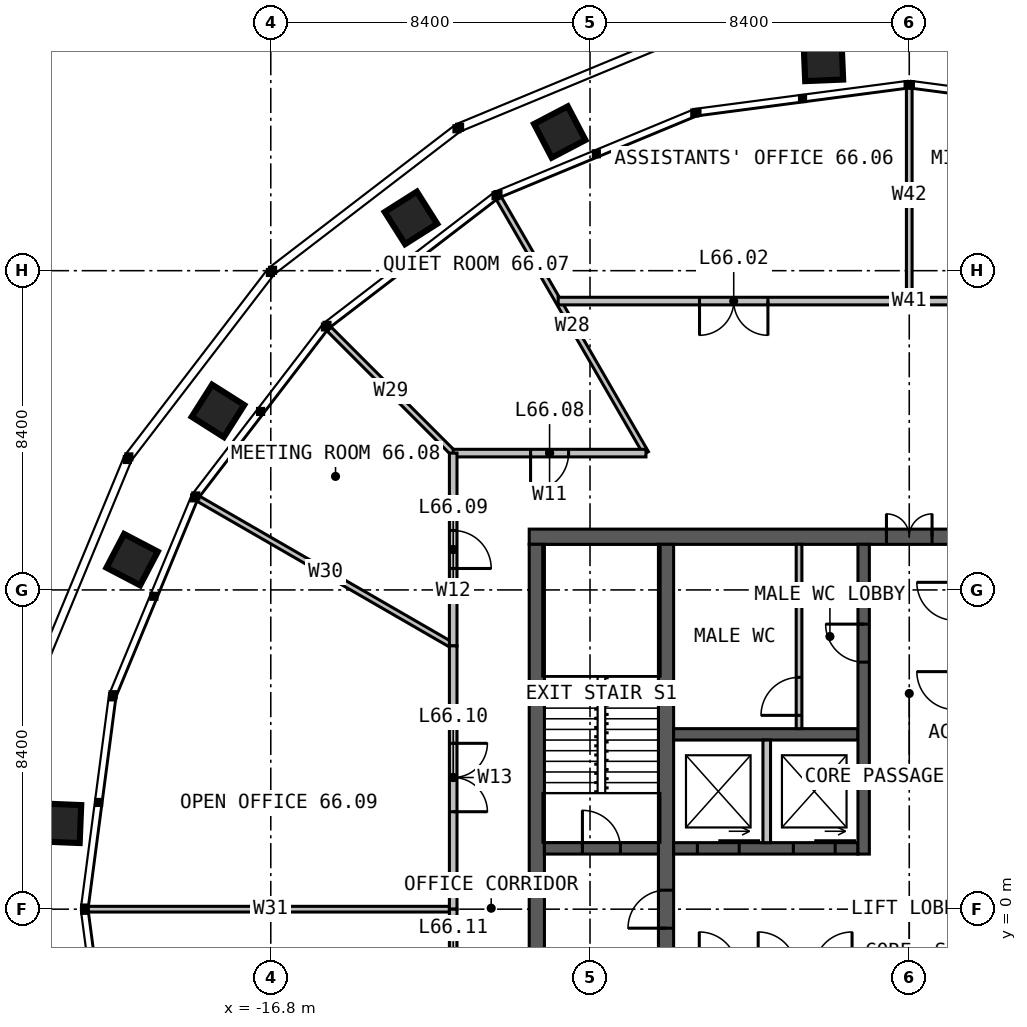
"""IFC4 building model, lengths in metres.
Left out: names, types, materials, properties, quantities, classifications, styles, units other than length and angle.
Written with IfcOpenShell. Run it as: python <this file> out.ifc"""

import sys

from ifc_helpers import new_model, si_unit, direction, frame, frame_2d, origin, place, context, subcontext, project, spatial, rectangle, extrude, element, fill, save


model = new_model("IFC4")
c1 = context("Model", 3, precision=1e-05, world=origin(), true_north=direction((0.0, 1.0)))
c2 = subcontext(c1, "Body", "Model", "MODEL_VIEW")
j1 = project(units=[si_unit("LENGTHUNIT", "METRE"), si_unit("PLANEANGLEUNIT", "RADIAN")], contexts=[c1])
p1 = place(None, origin())
s1 = spatial("IfcSite", under=j1, at=p1, CompositionType="ELEMENT")
p2 = place(p1, origin())
s2 = spatial("IfcBuilding", under=s1, at=p2, CompositionType="ELEMENT")
p3 = place(p2, frame((0.0, 0.0, 272.0)))
s3 = spatial("IfcBuildingStorey", under=s2, at=p3, CompositionType="ELEMENT", Elevation=272.0)
p4 = place(p3, frame((-10.0, 9.8, 0.0), z_axis=(0.0, 0.0, 1.0), x_axis=(1.0, 0.0, 0.0)))
e1 = element("IfcWall", 1, at=p4, inside=s3, PredefinedType="SOLIDWALL", context=c2, shape_type="SweptSolid", body=[
    extrude(rectangle(XDim=20.0, YDim=0.4, at=frame_2d((10.0, 0.0))), origin(), (0.0, 0.0, 1.0), 4.0),
])
p5 = place(p4, frame((9.4, 0.0, 0.0)))
e2 = element("IfcOpeningElement", 2, at=p5, cuts=e1, PredefinedType="OPENING", context=c2, shape_type="SweptSolid", body=[
    extrude(rectangle(XDim=1.2, YDim=2.2, at=frame_2d((0.6, 1.1))), frame((0.0, 0.21, 0.0), z_axis=(0.0, -1.0, 0.0), x_axis=(1.0, 0.0, 0.0)), (0.0, 0.0, 1.0), 0.42),
])
p6 = place(p3, frame((-9.8, 9.6, 0.0), z_axis=(0.0, 0.0, 1.0), x_axis=(0.0, -1.0, 0.0)))
e3 = element("IfcWall", 3, at=p6, inside=s3, PredefinedType="SOLIDWALL", context=c2, shape_type="SweptSolid", body=[
    extrude(rectangle(XDim=19.2, YDim=0.4, at=frame_2d((9.6, 0.0))), origin(), (0.0, 0.0, 1.0), 4.0),
])
p7 = place(p3, frame((-6.4, -9.6, 0.0), z_axis=(0.0, 0.0, 1.0), x_axis=(0.0, 1.0, 0.0)))
e4 = element("IfcWall", 4, at=p7, inside=s3, PredefinedType="SOLIDWALL", context=c2, shape_type="SweptSolid", body=[
    extrude(rectangle(XDim=19.2, YDim=0.4, at=frame_2d((9.6, 0.0))), origin(), (0.0, 0.0, 1.0), 4.0),
])
p8 = place(p7, frame((9.1, 0.0, 0.0)))
e5 = element("IfcOpeningElement", 5, at=p8, cuts=e4, PredefinedType="OPENING", context=c2, shape_type="SweptSolid", body=[
    extrude(rectangle(XDim=1.0, YDim=2.2, at=frame_2d((0.5, 1.1))), frame((0.0, 0.21, 0.0), z_axis=(0.0, -1.0, 0.0), x_axis=(1.0, 0.0, 0.0)), (0.0, 0.0, 1.0), 0.42),
])
p9 = place(p3, frame((-6.2, 1.6, 0.0), z_axis=(0.0, 0.0, 1.0), x_axis=(1.0, 0.0, 0.0)))
e6 = element("IfcWall", 6, at=p9, inside=s3, PredefinedType="SOLIDWALL", context=c2, shape_type="SweptSolid", body=[
    extrude(rectangle(XDim=4.85, YDim=0.3, at=frame_2d((2.425, 0.0))), origin(), (0.0, 0.0, 1.0), 4.0),
])
p10 = place(p9, frame((0.625, 0.0, 0.0)))
e7 = element("IfcOpeningElement", 7, at=p10, cuts=e6, PredefinedType="OPENING", context=c2, shape_type="SweptSolid", body=[
    extrude(rectangle(XDim=1.1, YDim=2.2, at=frame_2d((0.55, 1.1))), frame((0.0, 0.16, 0.0), z_axis=(0.0, -1.0, 0.0), x_axis=(1.0, 0.0, 0.0)), (0.0, 0.0, 1.0), 0.32),
])
p11 = place(p9, frame((3.15, 0.0, 0.0)))
e8 = element("IfcOpeningElement", 8, at=p11, cuts=e6, PredefinedType="OPENING", context=c2, shape_type="SweptSolid", body=[
    extrude(rectangle(XDim=1.1, YDim=2.2, at=frame_2d((0.55, 1.1))), frame((0.0, 0.16, 0.0), z_axis=(0.0, -1.0, 0.0), x_axis=(1.0, 0.0, 0.0)), (0.0, 0.0, 1.0), 0.32),
])
p12 = place(p3, frame((-6.2, 4.6, 0.0), z_axis=(0.0, 0.0, 1.0), x_axis=(1.0, 0.0, 0.0)))
e9 = element("IfcWall", 9, at=p12, inside=s3, PredefinedType="SOLIDWALL", context=c2, shape_type="SweptSolid", body=[
    extrude(rectangle(XDim=4.85, YDim=0.3, at=frame_2d((2.425, 0.0))), origin(), (0.0, 0.0, 1.0), 4.0),
])
p13 = place(p3, frame((-1.2, 1.45, 0.0), z_axis=(0.0, 0.0, 1.0), x_axis=(0.0, 1.0, 0.0)))
e10 = element("IfcWall", 10, at=p13, inside=s3, PredefinedType="SOLIDWALL", context=c2, shape_type="SweptSolid", body=[
    extrude(rectangle(XDim=8.15, YDim=0.3, at=frame_2d((4.075, 0.0))), origin(), (0.0, 0.0, 1.0), 4.0),
])
p14 = place(p13, frame((5.05, 0.0, 0.0)))
e11 = element("IfcOpeningElement", 11, at=p14, cuts=e10, PredefinedType="OPENING", context=c2, shape_type="SweptSolid", body=[
    extrude(rectangle(XDim=1.0, YDim=2.2, at=frame_2d((0.5, 1.1))), frame((0.0, 0.16, 0.0), z_axis=(0.0, -1.0, 0.0), x_axis=(1.0, 0.0, 0.0)), (0.0, 0.0, 1.0), 0.32),
])
p15 = place(p3, frame((-9.6, 1.6, 0.0), z_axis=(0.0, 0.0, 1.0), x_axis=(1.0, 0.0, 0.0)))
e12 = element("IfcWall", 12, at=p15, inside=s3, PredefinedType="SOLIDWALL", context=c2, shape_type="SweptSolid", body=[
    extrude(rectangle(XDim=3.0, YDim=0.3, at=frame_2d((1.5, 0.0))), origin(), (0.0, 0.0, 1.0), 4.0),
])
p16 = place(p15, frame((1.0, 0.0, 0.0)))
e13 = element("IfcOpeningElement", 13, at=p16, cuts=e12, PredefinedType="OPENING", context=c2, shape_type="SweptSolid", body=[
    extrude(rectangle(XDim=1.0, YDim=2.2, at=frame_2d((0.5, 1.1))), frame((0.0, 0.16, 0.0), z_axis=(0.0, -1.0, 0.0), x_axis=(1.0, 0.0, 0.0)), (0.0, 0.0, 1.0), 0.32),
])
p17 = place(p3, frame((-3.75, 1.75, 0.0), z_axis=(0.0, 0.0, 1.0), x_axis=(0.0, 1.0, 0.0)))
e14 = element("IfcWall", 14, at=p17, inside=s3, PredefinedType="SOLIDWALL", context=c2, shape_type="SweptSolid", body=[
    extrude(rectangle(XDim=2.7, YDim=0.2, at=frame_2d((1.35, 0.0))), origin(), (0.0, 0.0, 1.0), 3.75),
])
p18 = place(p3, frame((-2.9, 4.75, 0.0), z_axis=(0.0, 0.0, 1.0), x_axis=(0.0, 1.0, 0.0)))
e15 = element("IfcWall", 15, at=p18, inside=s3, PredefinedType="PARTITIONING", context=c2, shape_type="SweptSolid", body=[
    extrude(rectangle(XDim=4.85, YDim=0.15, at=frame_2d((2.425, 0.0))), origin(), (0.0, 0.0, 1.0), 3.75),
])
p19 = place(p18, frame((0.35, 0.0, 0.0)))
e16 = element("IfcOpeningElement", 16, at=p19, cuts=e15, PredefinedType="OPENING", context=c2, shape_type="SweptSolid", body=[
    extrude(rectangle(XDim=1.0, YDim=2.2, at=frame_2d((0.5, 1.1))), frame((0.0, 0.085, 0.0), z_axis=(0.0, -1.0, 0.0), x_axis=(1.0, 0.0, 0.0)), (0.0, 0.0, 1.0), 0.17),
])
p20 = place(p3, frame((-6.928, 12.0, 0.0), z_axis=(0.0, 0.0, 1.0), x_axis=(-0.500000526688, 0.866025099701, 0.0)))
e17 = element("IfcWall", 17, at=p20, inside=s3, PredefinedType="PARTITIONING", context=c2, shape_type="SweptSolid", body=[
    extrude(rectangle(XDim=7.752, YDim=0.15, at=frame_2d((3.876, 0.0))), origin(), (0.0, 0.0, 1.0), 2.79),
])
p21 = place(p3, frame((-12.0, 12.0, 0.0), z_axis=(0.0, 0.0, 1.0), x_axis=(-0.707106781187, 0.707106781187, 0.0)))
e18 = element("IfcWall", 18, at=p21, inside=s3, PredefinedType="PARTITIONING", context=c2, shape_type="SweptSolid", body=[
    extrude(rectangle(XDim=4.638, YDim=0.15, at=frame_2d((2.319, 0.0))), origin(), (0.0, 0.0, 1.0), 2.79),
])
p22 = place(p3, frame((-12.0, 6.928, 0.0), z_axis=(0.0, 0.0, 1.0), x_axis=(-0.866025099701, 0.500000526688, 0.0)))
e19 = element("IfcWall", 19, at=p22, inside=s3, PredefinedType="PARTITIONING", context=c2, shape_type="SweptSolid", body=[
    extrude(rectangle(XDim=7.752, YDim=0.15, at=frame_2d((3.876, 0.0))), origin(), (0.0, 0.0, 1.0), 2.79),
])
p23 = place(p3, frame((-12.0, 0.0, 0.0), z_axis=(0.0, 0.0, 1.0), x_axis=(-1.0, 0.0, 0.0)))
e20 = element("IfcWall", 20, at=p23, inside=s3, PredefinedType="PARTITIONING", context=c2, shape_type="SweptSolid", body=[
    extrude(rectangle(XDim=9.608, YDim=0.15, at=frame_2d((4.804, 0.0))), origin(), (0.0, 0.0, 1.0), 2.79),
])
p24 = place(p3, frame((9.238, 16.0, 0.0), z_axis=(0.0, 0.0, 1.0), x_axis=(-1.0, 0.0, 0.0)))
e21 = element("IfcWall", 21, at=p24, inside=s3, PredefinedType="PARTITIONING", context=c2, shape_type="SweptSolid", body=[
    extrude(rectangle(XDim=18.475, YDim=0.2, at=frame_2d((9.238, 0.0))), origin(), (0.0, 0.0, 1.0), 3.8),
])
p25 = place(p24, frame((3.719, 0.0, 0.0)))
e22 = element("IfcOpeningElement", 22, at=p25, cuts=e21, PredefinedType="OPENING", context=c2, shape_type="SweptSolid", body=[
    extrude(rectangle(XDim=1.8, YDim=2.2, at=frame_2d((0.9, 1.1))), frame((0.0, 0.11, 0.0), z_axis=(0.0, -1.0, 0.0), x_axis=(1.0, 0.0, 0.0)), (0.0, 0.0, 1.0), 0.22),
])
p26 = place(p24, frame((12.956, 0.0, 0.0)))
e23 = element("IfcOpeningElement", 23, at=p26, cuts=e21, PredefinedType="OPENING", context=c2, shape_type="SweptSolid", body=[
    extrude(rectangle(XDim=1.8, YDim=2.2, at=frame_2d((0.9, 1.1))), frame((0.0, 0.11, 0.0), z_axis=(0.0, -1.0, 0.0), x_axis=(1.0, 0.0, 0.0)), (0.0, 0.0, 1.0), 0.22),
])
p27 = place(p3, frame((0.0, 16.0, 0.0), z_axis=(0.0, 0.0, 1.0), x_axis=(0.0, 1.0, 0.0)))
e24 = element("IfcWall", 24, at=p27, inside=s3, PredefinedType="PARTITIONING", context=c2, shape_type="SweptSolid", body=[
    extrude(rectangle(XDim=5.608, YDim=0.15, at=frame_2d((2.804, 0.0))), origin(), (0.0, 0.0, 1.0), 2.79),
])
p28 = place(p3, frame((-6.928, 12.0, 0.0), z_axis=(0.0, 0.0, 1.0), x_axis=(-1.0, 0.0, 0.0)))
e25 = element("IfcWall", 25, at=p28, inside=s3, PredefinedType="PARTITIONING", context=c2, shape_type="SweptSolid", body=[
    extrude(rectangle(XDim=5.072, YDim=0.2, at=frame_2d((2.536, 0.0))), origin(), (0.0, 0.0, 1.0), 3.8),
])
p29 = place(p28, frame((2.036, 0.0, 0.0)))
e26 = element("IfcOpeningElement", 26, at=p29, cuts=e25, PredefinedType="OPENING", context=c2, shape_type="SweptSolid", body=[
    extrude(rectangle(XDim=1.0, YDim=2.2, at=frame_2d((0.5, 1.1))), frame((0.0, 0.11, 0.0), z_axis=(0.0, -1.0, 0.0), x_axis=(1.0, 0.0, 0.0)), (0.0, 0.0, 1.0), 0.22),
])
p30 = place(p3, frame((-12.0, 12.0, 0.0), z_axis=(0.0, 0.0, 1.0), x_axis=(0.0, -1.0, 0.0)))
e27 = element("IfcWall", 27, at=p30, inside=s3, PredefinedType="PARTITIONING", context=c2, shape_type="SweptSolid", body=[
    extrude(rectangle(XDim=5.072, YDim=0.2, at=frame_2d((2.536, 0.0))), origin(), (0.0, 0.0, 1.0), 3.8),
])
p31 = place(p30, frame((2.036, 0.0, 0.0)))
e28 = element("IfcOpeningElement", 28, at=p31, cuts=e27, PredefinedType="OPENING", context=c2, shape_type="SweptSolid", body=[
    extrude(rectangle(XDim=1.0, YDim=2.2, at=frame_2d((0.5, 1.1))), frame((0.0, 0.11, 0.0), z_axis=(0.0, -1.0, 0.0), x_axis=(1.0, 0.0, 0.0)), (0.0, 0.0, 1.0), 0.22),
])
p32 = place(p3, frame((-12.0, 6.928, 0.0), z_axis=(0.0, 0.0, 1.0), x_axis=(0.0, -1.0, 0.0)))
e29 = element("IfcWall", 29, at=p32, inside=s3, PredefinedType="PARTITIONING", context=c2, shape_type="SweptSolid", body=[
    extrude(rectangle(XDim=6.928, YDim=0.2, at=frame_2d((3.464, 0.0))), origin(), (0.0, 0.0, 1.0), 3.8),
])
p33 = place(p32, frame((2.564, 0.0, 0.0)))
e30 = element("IfcOpeningElement", 30, at=p33, cuts=e29, PredefinedType="OPENING", context=c2, shape_type="SweptSolid", body=[
    extrude(rectangle(XDim=1.8, YDim=2.2, at=frame_2d((0.9, 1.1))), frame((0.0, 0.11, 0.0), z_axis=(0.0, -1.0, 0.0), x_axis=(1.0, 0.0, 0.0)), (0.0, 0.0, 1.0), 0.22),
])
p34 = place(p3, frame((-12.0, 0.0, 0.0), z_axis=(0.0, 0.0, 1.0), x_axis=(0.0, -1.0, 0.0)))
e31 = element("IfcWall", 31, at=p34, inside=s3, PredefinedType="PARTITIONING", context=c2, shape_type="SweptSolid", body=[
    extrude(rectangle(XDim=3.215, YDim=0.2, at=frame_2d((1.608, 0.0))), origin(), (0.0, 0.0, 1.0), 3.8),
])
p35 = place(p34, frame((1.108, 0.0, 0.0)))
e32 = element("IfcOpeningElement", 32, at=p35, cuts=e31, PredefinedType="OPENING", context=c2, shape_type="SweptSolid", body=[
    extrude(rectangle(XDim=1.0, YDim=2.2, at=frame_2d((0.5, 1.1))), frame((0.0, 0.11, 0.0), z_axis=(0.0, -1.0, 0.0), x_axis=(1.0, 0.0, 0.0)), (0.0, 0.0, 1.0), 0.22),
])
p36 = place(p5, origin())
e33 = element("IfcDoor", 33, at=p36, inside=s3, OperationType="DOUBLE_DOOR_SINGLE_SWING", PredefinedType="DOOR", context=c2, shape_type="SweptSolid", body=[
    extrude(rectangle(XDim=1.2, YDim=2.2, at=frame_2d((0.6, 1.1))), frame((0.0, 0.025, 0.0), z_axis=(0.0, -1.0, 0.0), x_axis=(1.0, 0.0, 0.0)), (0.0, 0.0, 1.0), 0.05),
])
fill(e2, e33)
p37 = place(p8, origin())
e34 = element("IfcDoor", 34, at=p37, inside=s3, OperationType="SINGLE_SWING_LEFT", PredefinedType="DOOR", context=c2, shape_type="SweptSolid", body=[
    extrude(rectangle(XDim=1.0, YDim=2.2, at=frame_2d((0.5, 1.1))), frame((0.0, 0.025, 0.0), z_axis=(0.0, -1.0, 0.0), x_axis=(1.0, 0.0, 0.0)), (0.0, 0.0, 1.0), 0.05),
])
fill(e5, e34)
p38 = place(p16, origin())
e35 = element("IfcDoor", 35, at=p38, inside=s3, OperationType="SINGLE_SWING_LEFT", PredefinedType="DOOR", context=c2, shape_type="SweptSolid", body=[
    extrude(rectangle(XDim=1.0, YDim=2.2, at=frame_2d((0.5, 1.1))), frame((0.0, 0.025, 0.0), z_axis=(0.0, -1.0, 0.0), x_axis=(1.0, 0.0, 0.0)), (0.0, 0.0, 1.0), 0.05),
])
fill(e13, e35)
p39 = place(p14, origin())
e36 = element("IfcDoor", 36, at=p39, inside=s3, OperationType="SINGLE_SWING_RIGHT", PredefinedType="DOOR", context=c2, shape_type="SweptSolid", body=[
    extrude(rectangle(XDim=1.0, YDim=2.2, at=frame_2d((0.5, 1.1))), frame((0.0, 0.025, 0.0), z_axis=(0.0, -1.0, 0.0), x_axis=(1.0, 0.0, 0.0)), (0.0, 0.0, 1.0), 0.05),
])
fill(e11, e36)
p40 = place(p19, origin())
e37 = element("IfcDoor", 37, at=p40, inside=s3, OperationType="SINGLE_SWING_LEFT", PredefinedType="DOOR", context=c2, shape_type="SweptSolid", body=[
    extrude(rectangle(XDim=1.0, YDim=2.2, at=frame_2d((0.5, 1.1))), frame((0.0, 0.025, 0.0), z_axis=(0.0, -1.0, 0.0), x_axis=(1.0, 0.0, 0.0)), (0.0, 0.0, 1.0), 0.05),
])
fill(e16, e37)
p41 = place(p10, origin())
e38 = element("IfcDoor", 38, at=p41, inside=s3, OperationType="SLIDING_TO_LEFT", PredefinedType="DOOR", context=c2, shape_type="SweptSolid", body=[
    extrude(rectangle(XDim=1.1, YDim=2.2, at=frame_2d((0.55, 1.1))), frame((0.0, 0.025, 0.0), z_axis=(0.0, -1.0, 0.0), x_axis=(1.0, 0.0, 0.0)), (0.0, 0.0, 1.0), 0.05),
])
fill(e7, e38)
p42 = place(p11, origin())
e39 = element("IfcDoor", 39, at=p42, inside=s3, OperationType="SLIDING_TO_LEFT", PredefinedType="DOOR", context=c2, shape_type="SweptSolid", body=[
    extrude(rectangle(XDim=1.1, YDim=2.2, at=frame_2d((0.55, 1.1))), frame((0.0, 0.025, 0.0), z_axis=(0.0, -1.0, 0.0), x_axis=(1.0, 0.0, 0.0)), (0.0, 0.0, 1.0), 0.05),
])
fill(e8, e39)
p43 = place(p26, origin())
e40 = element("IfcDoor", 40, at=p43, inside=s3, OperationType="DOUBLE_DOOR_SINGLE_SWING", PredefinedType="DOOR", context=c2, shape_type="SweptSolid", body=[
    extrude(rectangle(XDim=1.8, YDim=2.2, at=frame_2d((0.9, 1.1))), frame((0.0, 0.025, 0.0), z_axis=(0.0, -1.0, 0.0), x_axis=(1.0, 0.0, 0.0)), (0.0, 0.0, 1.0), 0.05),
])
fill(e23, e40)
p44 = place(p29, origin())
e41 = element("IfcDoor", 41, at=p44, inside=s3, OperationType="SINGLE_SWING_RIGHT", PredefinedType="DOOR", context=c2, shape_type="SweptSolid", body=[
    extrude(rectangle(XDim=1.0, YDim=2.2, at=frame_2d((0.5, 1.1))), frame((0.0, 0.025, 0.0), z_axis=(0.0, -1.0, 0.0), x_axis=(1.0, 0.0, 0.0)), (0.0, 0.0, 1.0), 0.05),
])
fill(e26, e41)
p45 = place(p31, origin())
e42 = element("IfcDoor", 42, at=p45, inside=s3, OperationType="SINGLE_SWING_RIGHT", PredefinedType="DOOR", context=c2, shape_type="SweptSolid", body=[
    extrude(rectangle(XDim=1.0, YDim=2.2, at=frame_2d((0.5, 1.1))), frame((0.0, 0.025, 0.0), z_axis=(0.0, -1.0, 0.0), x_axis=(1.0, 0.0, 0.0)), (0.0, 0.0, 1.0), 0.05),
])
fill(e28, e42)
p46 = place(p33, origin())
e43 = element("IfcDoor", 43, at=p46, inside=s3, OperationType="DOUBLE_DOOR_SINGLE_SWING", PredefinedType="DOOR", context=c2, shape_type="SweptSolid", body=[
    extrude(rectangle(XDim=1.8, YDim=2.2, at=frame_2d((0.9, 1.1))), frame((0.0, 0.025, 0.0), z_axis=(0.0, -1.0, 0.0), x_axis=(1.0, 0.0, 0.0)), (0.0, 0.0, 1.0), 0.05),
])
fill(e30, e43)
save(model, sys.argv[1])
